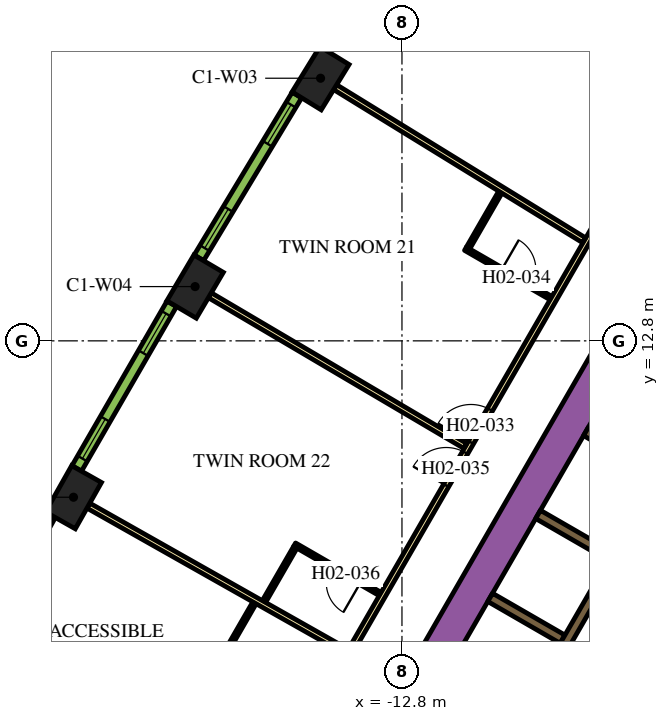
"""IFC4 building model, lengths in metres.
Left out: names, types, materials, properties, quantities, classifications, styles, units other than length and angle.
Written with IfcOpenShell. Run it as: python <this file> out.ifc"""

import sys

from ifc_helpers import new_model, si_unit, direction, frame, frame_2d, origin, origin_2d, place, context, subcontext, project, spatial, rectangle, extrude, element, fill, save


model = new_model("IFC4")
c1 = context("Model", 3, precision=1e-05, world=origin(), true_north=direction((0.0, 1.0)))
c2 = subcontext(c1, "Body", "Model", "MODEL_VIEW")
j1 = project(units=[si_unit("LENGTHUNIT", "METRE"), si_unit("PLANEANGLEUNIT", "RADIAN")], contexts=[c1])
p1 = place(None, origin())
s1 = spatial("IfcSite", under=j1, at=p1, CompositionType="ELEMENT")
p2 = place(p1, origin())
s2 = spatial("IfcBuilding", under=s1, at=p2, CompositionType="ELEMENT")
p3 = place(p2, frame((0.0, 0.0, 47.1)))
s3 = spatial("IfcBuildingStorey", under=s2, at=p3, CompositionType="ELEMENT", Elevation=47.1)
for number, where, z_axis, x_axis in (
    (1, (-14.942, 19.71, 0.0), (0.0, 0.0, 1.0), (-0.524, -0.852, 0.0)),
    (2, (-18.243, 14.228, 0.0), (0.0, 0.0, 1.0), (-0.508, -0.861, 0.0)),
    (3, (-21.443, 8.685, 0.0), (0.0, 0.0, 1.0), (-0.492, -0.871, 0.0)),
):
    element("IfcColumn", number, at=place(p3, frame(where, z_axis=z_axis, x_axis=x_axis)), inside=s3, PredefinedType="COLUMN", context=c2, shape_type="SweptSolid", body=[
        extrude(rectangle(XDim=1.4, YDim=0.9, at=origin_2d()), origin(), (0.0, 0.0, 1.0), 3.9),
    ])
p4 = place(p3, frame((-15.36, -1.503, 0.0), z_axis=(0.0, 0.0, 1.0), x_axis=(0.50000389221, 0.866023156604, 0.0)))
e4 = element("IfcWall", 4, at=p4, inside=s3, PredefinedType="SOLIDWALL", context=c2, shape_type="SweptSolid", body=[
    extrude(rectangle(XDim=21.0, YDim=0.9, at=frame_2d((10.5, 0.0))), origin(), (0.0, 0.0, 1.0), 3.9),
])
p5 = place(p3, frame((-8.06, -1.311, 0.0), z_axis=(0.0, 0.0, 1.0), x_axis=(0.50000273126, 0.866023826885, 0.0)))
e5 = element("IfcWall", 5, at=p5, inside=s3, PredefinedType="SOLIDWALL", context=c2, shape_type="SweptSolid", body=[
    extrude(rectangle(XDim=10.33, YDim=0.25, at=frame_2d((5.165, 0.0))), origin(), (0.0, 0.0, 1.0), 3.9),
])
for number, where, z_axis, x_axis in (
    (6, (-8.574, 4.95, 0.0), (0.0, 0.0, 1.0), (-0.866, 0.5, 0.0)),
    (7, (-7.314, 7.132, 0.0), (0.0, 0.0, 1.0), (-0.866, 0.5, 0.0)),
):
    element("IfcWall", number, at=place(p3, frame(where, z_axis=z_axis, x_axis=x_axis)), inside=s3, PredefinedType="SOLIDWALL", context=c2, shape_type="SweptSolid", body=[
        extrude(rectangle(XDim=2.2, YDim=0.25, at=frame_2d((1.1, 0.0))), origin(), (0.0, 0.0, 1.0), 3.9),
    ])
p6 = place(p3, frame((-6.296, 9.455, 0.0), z_axis=(0.0, 0.0, 1.0), x_axis=(-0.866011930837, 0.500023335103, 0.0)))
e8 = element("IfcWall", 8, at=p6, inside=s3, PredefinedType="SOLIDWALL", context=c2, shape_type="SweptSolid", body=[
    extrude(rectangle(XDim=1.92, YDim=0.25, at=frame_2d((0.96, 0.0))), origin(), (0.0, 0.0, 1.0), 3.9),
])
p7 = place(p3, frame((-6.008, 9.144, 0.0), z_axis=(0.0, 0.0, 1.0), x_axis=(-0.500006956611, -0.866021387346, 0.0)))
e9 = element("IfcWall", 9, at=p7, inside=s3, PredefinedType="SOLIDWALL", context=c2, shape_type="SweptSolid", body=[
    extrude(rectangle(XDim=9.83, YDim=0.25, at=frame_2d((4.915, 0.0))), origin(), (0.0, 0.0, 1.0), 3.9),
])
p8 = place(p7, frame((6.985, 0.0, 0.0)))
e10 = element("IfcOpeningElement", 10, at=p8, cuts=e9, PredefinedType="OPENING", context=c2, shape_type="SweptSolid", body=[
    extrude(rectangle(XDim=0.9, YDim=2.1, at=frame_2d((0.45, 1.05))), frame((0.0, 0.135, 0.0), z_axis=(0.0, -1.0, 0.0), x_axis=(1.0, 0.0, 0.0)), (0.0, 0.0, 1.0), 0.27),
])
p9 = place(p3, frame((-19.081, -3.9, 0.0), z_axis=(0.0, 0.0, 1.0), x_axis=(0.499998313975, 0.866026377209, 0.0)))
e11 = element("IfcWall", 11, at=p9, inside=s3, PredefinedType="PARTITIONING", context=c2, shape_type="SweptSolid", body=[
    extrude(rectangle(XDim=25.766, YDim=0.15, at=frame_2d((12.883, 0.0))), origin(), (0.0, 0.0, 1.0), 2.75),
])
p10 = place(p9, frame((16.196, 0.0, 0.0)))
e12 = element("IfcOpeningElement", 12, at=p10, cuts=e11, PredefinedType="OPENING", context=c2, shape_type="SweptSolid", body=[
    extrude(rectangle(XDim=1.0, YDim=2.1, at=frame_2d((0.5, 1.05))), frame((0.0, 0.085, 0.0), z_axis=(0.0, -1.0, 0.0), x_axis=(1.0, 0.0, 0.0)), (0.0, 0.0, 1.0), 0.17),
])
p11 = place(p9, frame((14.889, 0.0, 0.0)))
e13 = element("IfcOpeningElement", 13, at=p11, cuts=e11, PredefinedType="OPENING", context=c2, shape_type="SweptSolid", body=[
    extrude(rectangle(XDim=1.0, YDim=2.1, at=frame_2d((0.5, 1.05))), frame((0.0, 0.085, 0.0), z_axis=(0.0, -1.0, 0.0), x_axis=(1.0, 0.0, 0.0)), (0.0, 0.0, 1.0), 0.17),
])
p12 = place(p9, frame((3.698, 0.0, 0.0)))
e14 = element("IfcOpeningElement", 14, at=p12, cuts=e11, PredefinedType="OPENING", context=c2, shape_type="SweptSolid", body=[
    extrude(rectangle(XDim=1.1, YDim=2.1, at=frame_2d((0.55, 1.05))), frame((0.0, 0.085, 0.0), z_axis=(0.0, -1.0, 0.0), x_axis=(1.0, 0.0, 0.0)), (0.0, 0.0, 1.0), 0.17),
])
p13 = place(p9, frame((2.392, 0.0, 0.0)))
e15 = element("IfcOpeningElement", 15, at=p13, cuts=e11, PredefinedType="OPENING", context=c2, shape_type="SweptSolid", body=[
    extrude(rectangle(XDim=1.0, YDim=2.1, at=frame_2d((0.5, 1.05))), frame((0.0, 0.085, 0.0), z_axis=(0.0, -1.0, 0.0), x_axis=(1.0, 0.0, 0.0)), (0.0, 0.0, 1.0), 0.17),
])
p14 = place(p3, frame((-21.052, 8.464, 0.0), z_axis=(0.0, 0.0, 1.0), x_axis=(0.87059371954, -0.492002617368, 0.0)))
e16 = element("IfcWall", 16, at=p14, inside=s3, PredefinedType="PARTITIONING", context=c2, shape_type="SweptSolid", body=[
    extrude(rectangle(XDim=7.803, YDim=0.15, at=frame_2d((3.902, 0.0))), origin(), (0.0, 0.0, 1.0), 2.75),
])
p15 = place(p3, frame((-17.856, 13.999, 0.0), z_axis=(0.0, 0.0, 1.0), x_axis=(0.861371519381, -0.507975497047, 0.0)))
e17 = element("IfcWall", 17, at=p15, inside=s3, PredefinedType="PARTITIONING", context=c2, shape_type="SweptSolid", body=[
    extrude(rectangle(XDim=7.804, YDim=0.15, at=frame_2d((3.902, 0.0))), origin(), (0.0, 0.0, 1.0), 2.75),
])
p16 = place(p3, frame((-14.558, 19.475, 0.0), z_axis=(0.0, 0.0, 1.0), x_axis=(0.851829455142, -0.523819223925, 0.0)))
e18 = element("IfcWall", 18, at=p16, inside=s3, PredefinedType="PARTITIONING", context=c2, shape_type="SweptSolid", body=[
    extrude(rectangle(XDim=7.688, YDim=0.15, at=frame_2d((3.844, 0.0))), origin(), (0.0, 0.0, 1.0), 2.75),
])
p17 = place(p3, frame((-11.129, 15.224, 0.0), z_axis=(0.0, 0.0, 1.0), x_axis=(0.866021400173, -0.500006934395, 0.0)))
e19 = element("IfcWall", 19, at=p17, inside=s3, PredefinedType="PARTITIONING", context=c2, shape_type="SweptSolid", body=[
    extrude(rectangle(XDim=2.6, YDim=0.1, at=frame_2d((1.3, 0.0))), origin(), (0.0, 0.0, 1.0), 2.75),
])
p18 = place(p17, frame((1.1, 0.0, 0.0)))
e20 = element("IfcOpeningElement", 20, at=p18, cuts=e19, PredefinedType="OPENING", context=c2, shape_type="SweptSolid", body=[
    extrude(rectangle(XDim=0.9, YDim=2.1, at=frame_2d((0.45, 1.05))), frame((0.0, 0.06, 0.0), z_axis=(0.0, -1.0, 0.0), x_axis=(1.0, 0.0, 0.0)), (0.0, 0.0, 1.0), 0.12),
])
p19 = place(p3, frame((-11.061, 15.242, 0.0), z_axis=(0.0, 0.0, 1.0), x_axis=(0.499976720371, 0.866038843867, 0.0)))
e21 = element("IfcWall", 21, at=p19, inside=s3, PredefinedType="PARTITIONING", context=c2, shape_type="SweptSolid", body=[
    extrude(rectangle(XDim=1.69, YDim=0.1, at=frame_2d((0.845, 0.0))), origin(), (0.0, 0.0, 1.0), 2.75),
])
p20 = place(p3, frame((-13.373, 6.138, 0.0), z_axis=(0.0, 0.0, 1.0), x_axis=(-0.866062058628, 0.499936506574, 0.0)))
e22 = element("IfcWall", 22, at=p20, inside=s3, PredefinedType="PARTITIONING", context=c2, shape_type="SweptSolid", body=[
    extrude(rectangle(XDim=2.6, YDim=0.1, at=frame_2d((1.3, 0.0))), origin(), (0.0, 0.0, 1.0), 2.75),
])
p21 = place(p20, frame((0.6, 0.0, 0.0)))
e23 = element("IfcOpeningElement", 23, at=p21, cuts=e22, PredefinedType="OPENING", context=c2, shape_type="SweptSolid", body=[
    extrude(rectangle(XDim=0.9, YDim=2.1, at=frame_2d((0.45, 1.05))), frame((0.0, 0.06, 0.0), z_axis=(0.0, -1.0, 0.0), x_axis=(1.0, 0.0, 0.0)), (0.0, 0.0, 1.0), 0.12),
])
p22 = place(p3, frame((-15.606, 7.37, 0.0), z_axis=(0.0, 0.0, 1.0), x_axis=(-0.499974350878, -0.866040211805, 0.0)))
e24 = element("IfcWall", 24, at=p22, inside=s3, PredefinedType="PARTITIONING", context=c2, shape_type="SweptSolid", body=[
    extrude(rectangle(XDim=1.65, YDim=0.1, at=frame_2d((0.825, 0.0))), origin(), (0.0, 0.0, 1.0), 2.75),
])
p23 = place(p3, frame((-17.878, 3.835, 0.0), z_axis=(0.0, 0.0, 1.0), x_axis=(0.500061428766, 0.865989934965, 0.0)))
e25 = element("IfcWall", 25, at=p23, inside=s3, PredefinedType="PARTITIONING", context=c2, shape_type="SweptSolid", body=[
    extrude(rectangle(XDim=2.39, YDim=0.1, at=frame_2d((1.195, 0.0))), origin(), (0.0, 0.0, 1.0), 2.75),
])
p24 = place(p3, frame((-12.17, 24.699, 0.0), z_axis=(0.0, 0.0, 1.0), x_axis=(-0.531688286542, -0.846940119462, 0.0)))
e26 = element("IfcWall", 26, at=p24, inside=s3, PredefinedType="SOLIDWALL", context=c2, shape_type="SweptSolid", body=[
    extrude(rectangle(XDim=4.998, YDim=0.29, at=frame_2d((2.499, 0.0))), origin(), (0.0, 0.0, 1.0), 3.65),
])
p25 = place(p24, frame((0.297, 0.0, 0.9)))
e27 = element("IfcOpeningElement", 27, at=p25, cuts=e26, PredefinedType="OPENING", context=c2, shape_type="SweptSolid", body=[
    extrude(rectangle(XDim=1.2, YDim=2.15, at=frame_2d((0.6, 1.075))), frame((0.0, 0.155, 0.0), z_axis=(0.0, -1.0, 0.0), x_axis=(1.0, 0.0, 0.0)), (0.0, 0.0, 1.0), 0.31),
])
p26 = place(p24, frame((3.501, 0.0, 0.9)))
e28 = element("IfcOpeningElement", 28, at=p26, cuts=e26, PredefinedType="OPENING", context=c2, shape_type="SweptSolid", body=[
    extrude(rectangle(XDim=1.2, YDim=2.15, at=frame_2d((0.6, 1.075))), frame((0.0, 0.155, 0.0), z_axis=(0.0, -1.0, 0.0), x_axis=(1.0, 0.0, 0.0)), (0.0, 0.0, 1.0), 0.31),
])
p27 = place(p3, frame((-15.564, 19.267, 0.0), z_axis=(0.0, 0.0, 1.0), x_axis=(-0.515938796285, -0.856625448191, 0.0)))
e29 = element("IfcWall", 29, at=p27, inside=s3, PredefinedType="SOLIDWALL", context=c2, shape_type="SweptSolid", body=[
    extrude(rectangle(XDim=4.998, YDim=0.29, at=frame_2d((2.499, 0.0))), origin(), (0.0, 0.0, 1.0), 3.65),
])
p28 = place(p27, frame((0.297, 0.0, 0.9)))
e30 = element("IfcOpeningElement", 30, at=p28, cuts=e29, PredefinedType="OPENING", context=c2, shape_type="SweptSolid", body=[
    extrude(rectangle(XDim=1.2, YDim=2.15, at=frame_2d((0.6, 1.075))), frame((0.0, 0.155, 0.0), z_axis=(0.0, -1.0, 0.0), x_axis=(1.0, 0.0, 0.0)), (0.0, 0.0, 1.0), 0.31),
])
p29 = place(p27, frame((3.501, 0.0, 0.9)))
e31 = element("IfcOpeningElement", 31, at=p29, cuts=e29, PredefinedType="OPENING", context=c2, shape_type="SweptSolid", body=[
    extrude(rectangle(XDim=1.2, YDim=2.15, at=frame_2d((0.6, 1.075))), frame((0.0, 0.155, 0.0), z_axis=(0.0, -1.0, 0.0), x_axis=(1.0, 0.0, 0.0)), (0.0, 0.0, 1.0), 0.31),
])
p30 = place(p3, frame((-18.858, 13.773, 0.0), z_axis=(0.0, 0.0, 1.0), x_axis=(-0.50002123722, -0.866013142123, 0.0)))
e32 = element("IfcWall", 32, at=p30, inside=s3, PredefinedType="SOLIDWALL", context=c2, shape_type="SweptSolid", body=[
    extrude(rectangle(XDim=4.998, YDim=0.29, at=frame_2d((2.499, 0.0))), origin(), (0.0, 0.0, 1.0), 3.65),
])
p31 = place(p30, frame((0.297, 0.0, 0.9)))
e33 = element("IfcOpeningElement", 33, at=p31, cuts=e32, PredefinedType="OPENING", context=c2, shape_type="SweptSolid", body=[
    extrude(rectangle(XDim=1.2, YDim=2.15, at=frame_2d((0.6, 1.075))), frame((0.0, 0.155, 0.0), z_axis=(0.0, -1.0, 0.0), x_axis=(1.0, 0.0, 0.0)), (0.0, 0.0, 1.0), 0.31),
])
p32 = place(p30, frame((3.501, 0.0, 0.9)))
e34 = element("IfcOpeningElement", 34, at=p32, cuts=e32, PredefinedType="OPENING", context=c2, shape_type="SweptSolid", body=[
    extrude(rectangle(XDim=1.2, YDim=2.15, at=frame_2d((0.6, 1.075))), frame((0.0, 0.155, 0.0), z_axis=(0.0, -1.0, 0.0), x_axis=(1.0, 0.0, 0.0)), (0.0, 0.0, 1.0), 0.31),
])
p33 = place(p3, frame((-22.05, 8.22, 0.0), z_axis=(0.0, 0.0, 1.0), x_axis=(-0.483912572871, -0.875116347589, 0.0)))
e35 = element("IfcWall", 35, at=p33, inside=s3, PredefinedType="SOLIDWALL", context=c2, shape_type="SweptSolid", body=[
    extrude(rectangle(XDim=4.998, YDim=0.29, at=frame_2d((2.499, 0.0))), origin(), (0.0, 0.0, 1.0), 3.65),
])
p34 = place(p33, frame((0.297, 0.0, 0.9)))
e36 = element("IfcOpeningElement", 36, at=p34, cuts=e35, PredefinedType="OPENING", context=c2, shape_type="SweptSolid", body=[
    extrude(rectangle(XDim=1.2, YDim=2.15, at=frame_2d((0.6, 1.075))), frame((0.0, 0.155, 0.0), z_axis=(0.0, -1.0, 0.0), x_axis=(1.0, 0.0, 0.0)), (0.0, 0.0, 1.0), 0.31),
])
p35 = place(p33, frame((3.501, 0.0, 0.9)))
e37 = element("IfcOpeningElement", 37, at=p35, cuts=e35, PredefinedType="OPENING", context=c2, shape_type="SweptSolid", body=[
    extrude(rectangle(XDim=1.2, YDim=2.15, at=frame_2d((0.6, 1.075))), frame((0.0, 0.155, 0.0), z_axis=(0.0, -1.0, 0.0), x_axis=(1.0, 0.0, 0.0)), (0.0, 0.0, 1.0), 0.31),
])
p36 = place(p10, origin())
e38 = element("IfcDoor", 38, at=p36, inside=s3, OperationType="SINGLE_SWING_LEFT", PredefinedType="DOOR", context=c2, shape_type="SweptSolid", body=[
    extrude(rectangle(XDim=1.0, YDim=2.1, at=frame_2d((0.5, 1.05))), frame((0.0, 0.025, 0.0), z_axis=(0.0, -1.0, 0.0), x_axis=(1.0, 0.0, 0.0)), (0.0, 0.0, 1.0), 0.05),
])
fill(e12, e38)
p37 = place(p18, origin())
e39 = element("IfcDoor", 39, at=p37, inside=s3, OperationType="SINGLE_SWING_RIGHT", PredefinedType="DOOR", context=c2, shape_type="SweptSolid", body=[
    extrude(rectangle(XDim=0.9, YDim=2.1, at=frame_2d((0.45, 1.05))), frame((0.0, 0.025, 0.0), z_axis=(0.0, -1.0, 0.0), x_axis=(1.0, 0.0, 0.0)), (0.0, 0.0, 1.0), 0.05),
])
fill(e20, e39)
p38 = place(p11, origin())
e40 = element("IfcDoor", 40, at=p38, inside=s3, OperationType="SINGLE_SWING_RIGHT", PredefinedType="DOOR", context=c2, shape_type="SweptSolid", body=[
    extrude(rectangle(XDim=1.0, YDim=2.1, at=frame_2d((0.5, 1.05))), frame((0.0, 0.025, 0.0), z_axis=(0.0, -1.0, 0.0), x_axis=(1.0, 0.0, 0.0)), (0.0, 0.0, 1.0), 0.05),
])
fill(e13, e40)
p39 = place(p21, origin())
e41 = element("IfcDoor", 41, at=p39, inside=s3, OperationType="SINGLE_SWING_LEFT", PredefinedType="DOOR", context=c2, shape_type="SweptSolid", body=[
    extrude(rectangle(XDim=0.9, YDim=2.1, at=frame_2d((0.45, 1.05))), frame((0.0, 0.025, 0.0), z_axis=(0.0, -1.0, 0.0), x_axis=(1.0, 0.0, 0.0)), (0.0, 0.0, 1.0), 0.05),
])
fill(e23, e41)
p40 = place(p28, origin())
e42 = element("IfcWindow", 42, at=p40, inside=s3, PartitioningType="DOUBLE_PANEL_VERTICAL", PredefinedType="WINDOW", context=c2, shape_type="SweptSolid", body=[
    extrude(rectangle(XDim=1.2, YDim=2.15, at=frame_2d((0.6, 1.075))), frame((0.0, 0.015, 0.0), z_axis=(0.0, -1.0, 0.0), x_axis=(1.0, 0.0, 0.0)), (0.0, 0.0, 1.0), 0.06),
])
fill(e30, e42)
p41 = place(p29, origin())
e43 = element("IfcWindow", 43, at=p41, inside=s3, PartitioningType="DOUBLE_PANEL_VERTICAL", PredefinedType="WINDOW", context=c2, shape_type="SweptSolid", body=[
    extrude(rectangle(XDim=1.2, YDim=2.15, at=frame_2d((0.6, 1.075))), frame((0.0, 0.015, 0.0), z_axis=(0.0, -1.0, 0.0), x_axis=(1.0, 0.0, 0.0)), (0.0, 0.0, 1.0), 0.06),
])
fill(e31, e43)
p42 = place(p31, origin())
e44 = element("IfcWindow", 44, at=p42, inside=s3, PartitioningType="DOUBLE_PANEL_VERTICAL", PredefinedType="WINDOW", context=c2, shape_type="SweptSolid", body=[
    extrude(rectangle(XDim=1.2, YDim=2.15, at=frame_2d((0.6, 1.075))), frame((0.0, 0.015, 0.0), z_axis=(0.0, -1.0, 0.0), x_axis=(1.0, 0.0, 0.0)), (0.0, 0.0, 1.0), 0.06),
])
fill(e33, e44)
p43 = place(p32, origin())
e45 = element("IfcWindow", 45, at=p43, inside=s3, PartitioningType="DOUBLE_PANEL_VERTICAL", PredefinedType="WINDOW", context=c2, shape_type="SweptSolid", body=[
    extrude(rectangle(XDim=1.2, YDim=2.15, at=frame_2d((0.6, 1.075))), frame((0.0, 0.015, 0.0), z_axis=(0.0, -1.0, 0.0), x_axis=(1.0, 0.0, 0.0)), (0.0, 0.0, 1.0), 0.06),
])
fill(e34, e45)
save(model, sys.argv[1])
